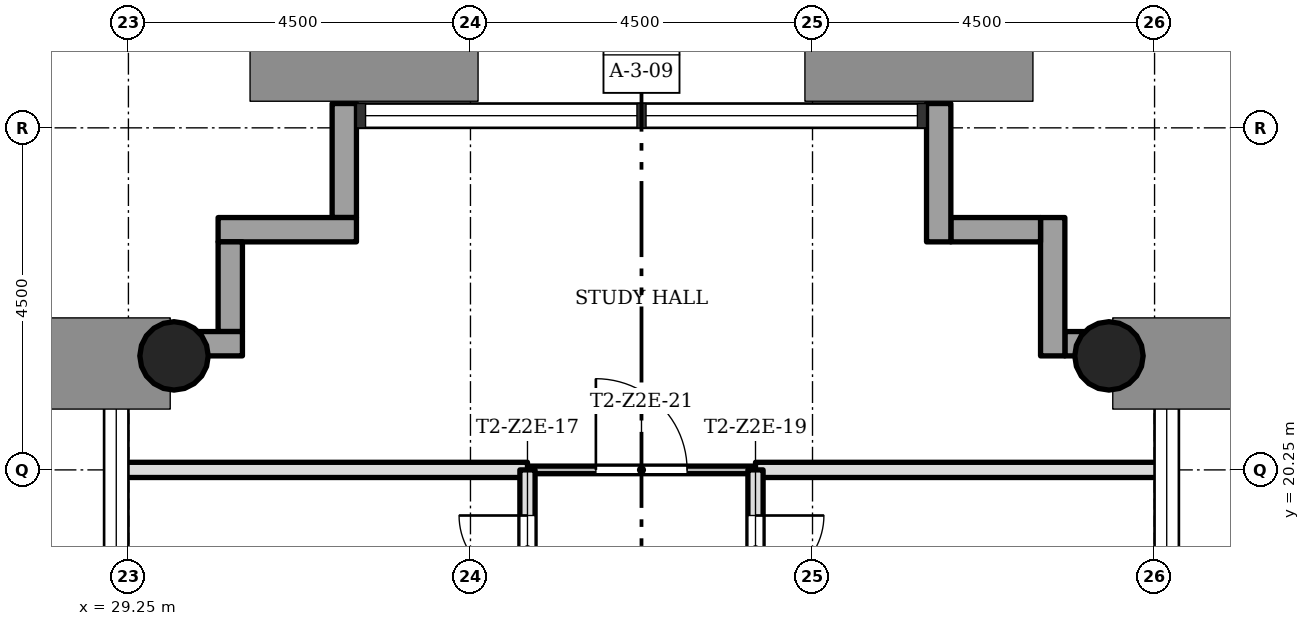
"""IFC4 building model, lengths in metres.
Left out: names, types, materials, properties, quantities, classifications, styles, units other than length and angle.
Written with IfcOpenShell. Run it as: python <this file> out.ifc"""

import sys

from ifc_helpers import new_model, si_unit, direction, frame, frame_2d, origin, origin_2d, place, context, subcontext, project, spatial, rectangle, hollow_circle, extrude, element, fill, save


model = new_model("IFC4")
c1 = context("Model", 3, precision=1e-05, world=origin(), true_north=direction((0.0, 1.0)))
c2 = subcontext(c1, "Body", "Model", "MODEL_VIEW")
j1 = project(units=[si_unit("LENGTHUNIT", "METRE"), si_unit("PLANEANGLEUNIT", "RADIAN")], contexts=[c1])
p1 = place(None, origin())
s1 = spatial("IfcSite", under=j1, at=p1, CompositionType="ELEMENT")
p2 = place(p1, origin())
s2 = spatial("IfcBuilding", under=s1, at=p2, CompositionType="ELEMENT")
p3 = place(p2, frame((0.0, 0.0, 100.4)))
s3 = spatial("IfcBuildingStorey", under=s2, at=p3, CompositionType="ELEMENT", Elevation=100.4)
for number, where, z_axis, x_axis in (
    (1, (42.15, 21.75, 0.0), (0.0, 0.0, 1.0), (1.0, 0.0, 0.0)),
    (2, (29.85, 21.75, 0.0), (0.0, 0.0, 1.0), (1.0, 0.0, 0.0)),
):
    element("IfcColumn", number, at=place(p3, frame(where, z_axis=z_axis, x_axis=x_axis)), inside=s3, PredefinedType="COLUMN", context=c2, shape_type="SweptSolid", body=[
        extrude(hollow_circle(Radius=0.45, WallThickness=0.032, at=origin_2d()), origin(), (0.0, 0.0, 1.0), 3.4),
    ])
p4 = place(p3, frame((43.07, 21.91, -0.3), z_axis=(0.0, 0.0, 1.0), x_axis=(-1.0, 0.0, 0.0)))
e3 = element("IfcWall", 3, at=p4, inside=s3, PredefinedType="STANDARD", context=c2, shape_type="SweptSolid", body=[
    extrude(rectangle(XDim=1.5, YDim=0.32, at=frame_2d((0.75, 0.0))), origin(), (0.0, 0.0, 1.0), 3.4),
])
p5 = place(p3, frame((41.41, 21.75, -0.3), z_axis=(0.0, 0.0, 1.0), x_axis=(0.0, 1.0, 0.0)))
e4 = element("IfcWall", 4, at=p5, inside=s3, PredefinedType="STANDARD", context=c2, shape_type="SweptSolid", body=[
    extrude(rectangle(XDim=1.82, YDim=0.32, at=frame_2d((0.91, 0.0))), origin(), (0.0, 0.0, 1.0), 3.4),
])
p6 = place(p3, frame((41.25, 23.41, -0.3), z_axis=(0.0, 0.0, 1.0), x_axis=(-1.0, 0.0, 0.0)))
e5 = element("IfcWall", 5, at=p6, inside=s3, PredefinedType="STANDARD", context=c2, shape_type="SweptSolid", body=[
    extrude(rectangle(XDim=1.18, YDim=0.32, at=frame_2d((0.59, 0.0))), origin(), (0.0, 0.0, 1.0), 3.4),
])
p7 = place(p3, frame((39.91, 23.25, -0.3), z_axis=(0.0, 0.0, 1.0), x_axis=(0.0, 1.0, 0.0)))
e6 = element("IfcWall", 6, at=p7, inside=s3, PredefinedType="STANDARD", context=c2, shape_type="SweptSolid", body=[
    extrude(rectangle(XDim=1.82, YDim=0.32, at=frame_2d((0.91, 0.0))), origin(), (0.0, 0.0, 1.0), 3.4),
])
p8 = place(p3, frame((32.09, 25.07, -0.3), z_axis=(0.0, 0.0, 1.0), x_axis=(0.0, -1.0, 0.0)))
e7 = element("IfcWall", 7, at=p8, inside=s3, PredefinedType="STANDARD", context=c2, shape_type="SweptSolid", body=[
    extrude(rectangle(XDim=1.5, YDim=0.32, at=frame_2d((0.75, 0.0))), origin(), (0.0, 0.0, 1.0), 3.4),
])
p9 = place(p3, frame((32.25, 23.41, -0.3), z_axis=(0.0, 0.0, 1.0), x_axis=(-1.0, 0.0, 0.0)))
e8 = element("IfcWall", 8, at=p9, inside=s3, PredefinedType="STANDARD", context=c2, shape_type="SweptSolid", body=[
    extrude(rectangle(XDim=1.82, YDim=0.32, at=frame_2d((0.91, 0.0))), origin(), (0.0, 0.0, 1.0), 3.4),
])
p10 = place(p3, frame((30.59, 23.25, -0.3), z_axis=(0.0, 0.0, 1.0), x_axis=(0.0, -1.0, 0.0)))
e9 = element("IfcWall", 9, at=p10, inside=s3, PredefinedType="STANDARD", context=c2, shape_type="SweptSolid", body=[
    extrude(rectangle(XDim=1.18, YDim=0.32, at=frame_2d((0.59, 0.0))), origin(), (0.0, 0.0, 1.0), 3.4),
])
p11 = place(p3, frame((30.75, 21.91, -0.3), z_axis=(0.0, 0.0, 1.0), x_axis=(-1.0, 0.0, 0.0)))
e10 = element("IfcWall", 10, at=p11, inside=s3, PredefinedType="STANDARD", context=c2, shape_type="SweptSolid", body=[
    extrude(rectangle(XDim=1.82, YDim=0.32, at=frame_2d((0.91, 0.0))), origin(), (0.0, 0.0, 1.0), 3.4),
])
p12 = place(p3, frame((37.5, 20.25, 0.0), z_axis=(0.0, 0.0, 1.0), x_axis=(-1.0, 0.0, 0.0)))
e11 = element("IfcWall", 11, at=p12, inside=s3, PredefinedType="PARTITIONING", context=c2, shape_type="SweptSolid", body=[
    extrude(rectangle(XDim=3.0, YDim=0.1, at=frame_2d((1.5, 0.0))), origin(), (0.0, 0.0, 1.0), 3.0),
])
p13 = place(p12, frame((0.9, 0.0, 0.0)))
e12 = element("IfcOpeningElement", 12, at=p13, cuts=e11, PredefinedType="OPENING", context=c2, shape_type="SweptSolid", body=[
    extrude(rectangle(XDim=1.2, YDim=2.1, at=frame_2d((0.6, 1.05))), frame((0.0, 0.06, 0.0), z_axis=(0.0, -1.0, 0.0), x_axis=(1.0, 0.0, 0.0)), (0.0, 0.0, 1.0), 0.12),
])
for number, where, z_axis, x_axis in (
    (13, (42.85, 20.25, 0.0), (0.0, 0.0, 1.0), (-1.0, 0.0, 0.0)),
    (14, (34.5, 20.25, 0.0), (0.0, 0.0, 1.0), (-1.0, 0.0, 0.0)),
):
    element("IfcWall", number, at=place(p3, frame(where, z_axis=z_axis, x_axis=x_axis)), inside=s3, PredefinedType="SOLIDWALL", context=c2, shape_type="SweptSolid", body=[
        extrude(rectangle(XDim=5.35, YDim=0.2, at=frame_2d((2.675, 0.0))), origin(), (0.0, 0.0, 1.0), 3.0),
    ])
p14 = place(p3, frame((37.5, 15.75, 0.0), z_axis=(0.0, 0.0, 1.0), x_axis=(0.0, 1.0, 0.0)))
e15 = element("IfcWall", 15, at=p14, inside=s3, PredefinedType="SOLIDWALL", context=c2, shape_type="SweptSolid", body=[
    extrude(rectangle(XDim=4.5, YDim=0.2, at=frame_2d((2.25, 0.0))), origin(), (0.0, 0.0, 1.0), 3.0),
])
p15 = place(p14, frame((3.0, 0.0, 0.0)))
e16 = element("IfcOpeningElement", 16, at=p15, cuts=e15, PredefinedType="OPENING", context=c2, shape_type="SweptSolid", body=[
    extrude(rectangle(XDim=0.9, YDim=2.1, at=frame_2d((0.45, 1.05))), frame((0.0, 0.11, 0.0), z_axis=(0.0, -1.0, 0.0), x_axis=(1.0, 0.0, 0.0)), (0.0, 0.0, 1.0), 0.22),
])
p16 = place(p3, frame((34.5, 15.75, 0.0), z_axis=(0.0, 0.0, 1.0), x_axis=(0.0, 1.0, 0.0)))
e17 = element("IfcWall", 17, at=p16, inside=s3, PredefinedType="SOLIDWALL", context=c2, shape_type="SweptSolid", body=[
    extrude(rectangle(XDim=4.5, YDim=0.2, at=frame_2d((2.25, 0.0))), origin(), (0.0, 0.0, 1.0), 3.0),
])
p17 = place(p16, frame((3.0, 0.0, 0.0)))
e18 = element("IfcOpeningElement", 18, at=p17, cuts=e17, PredefinedType="OPENING", context=c2, shape_type="SweptSolid", body=[
    extrude(rectangle(XDim=0.9, YDim=2.1, at=frame_2d((0.45, 1.05))), frame((0.0, 0.11, 0.0), z_axis=(0.0, -1.0, 0.0), x_axis=(1.0, 0.0, 0.0)), (0.0, 0.0, 1.0), 0.22),
])
p18 = place(p17, origin())
e19 = element("IfcDoor", 19, at=p18, inside=s3, OperationType="SINGLE_SWING_LEFT", PredefinedType="DOOR", context=c2, shape_type="SweptSolid", body=[
    extrude(rectangle(XDim=0.9, YDim=2.1, at=frame_2d((0.45, 1.05))), frame((0.0, 0.025, 0.0), z_axis=(0.0, -1.0, 0.0), x_axis=(1.0, 0.0, 0.0)), (0.0, 0.0, 1.0), 0.05),
])
fill(e18, e19)
p19 = place(p15, origin())
e20 = element("IfcDoor", 20, at=p19, inside=s3, OperationType="SINGLE_SWING_RIGHT", PredefinedType="DOOR", context=c2, shape_type="SweptSolid", body=[
    extrude(rectangle(XDim=0.9, YDim=2.1, at=frame_2d((0.45, 1.05))), frame((0.0, 0.025, 0.0), z_axis=(0.0, -1.0, 0.0), x_axis=(1.0, 0.0, 0.0)), (0.0, 0.0, 1.0), 0.05),
])
fill(e16, e20)
p20 = place(p13, origin())
e21 = element("IfcDoor", 21, at=p20, inside=s3, OperationType="SINGLE_SWING_RIGHT", PredefinedType="DOOR", context=c2, shape_type="SweptSolid", body=[
    extrude(rectangle(XDim=1.2, YDim=2.1, at=frame_2d((0.6, 1.05))), frame((0.0, 0.025, 0.0), z_axis=(0.0, -1.0, 0.0), x_axis=(1.0, 0.0, 0.0)), (0.0, 0.0, 1.0), 0.05),
])
fill(e12, e21)
save(model, sys.argv[1])
